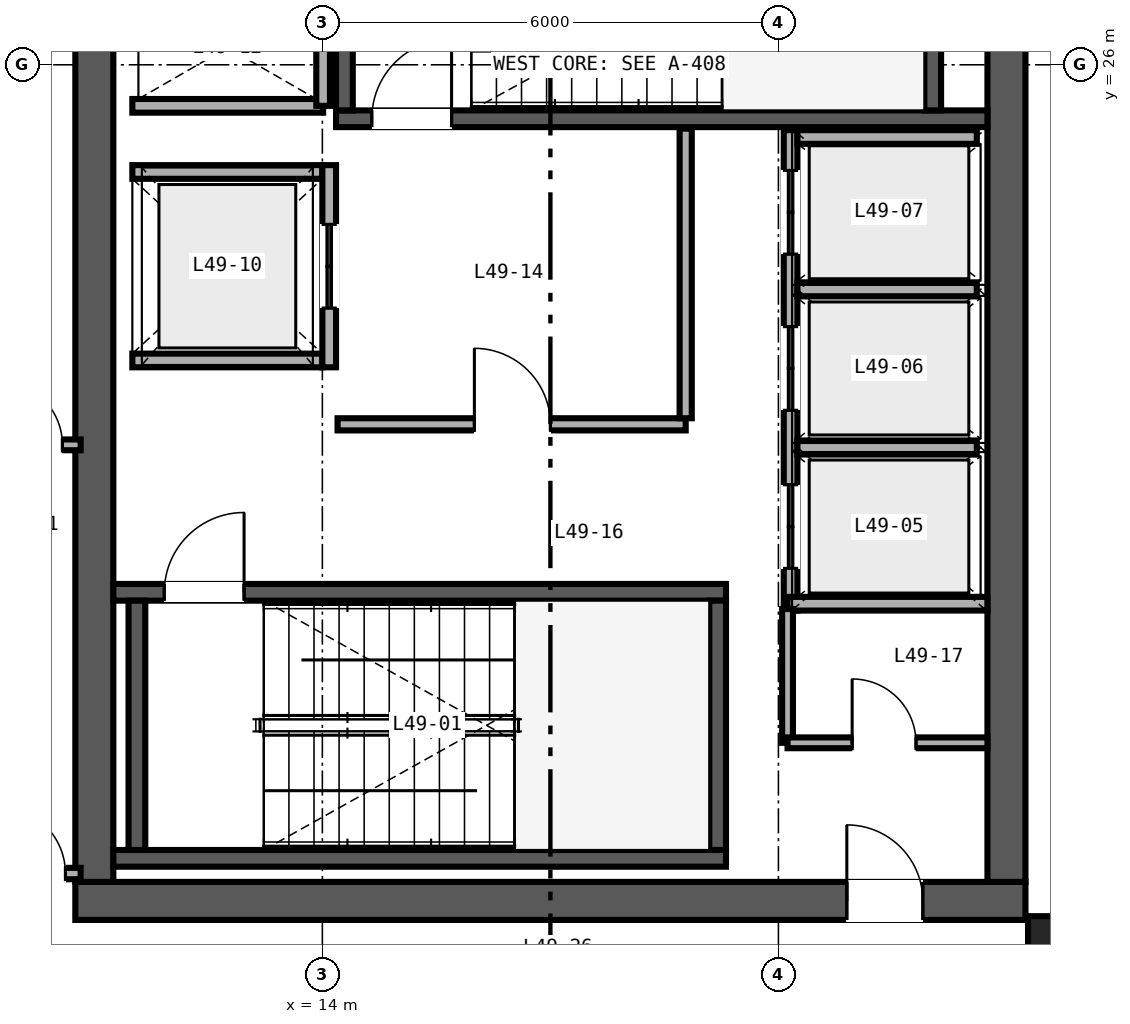
"""IFC4 building model, lengths in metres.
Left out: names, types, materials, properties, quantities, classifications, styles, units other than length and angle.
Written with IfcOpenShell. Run it as: python <this file> out.ifc"""

import sys

from ifc_helpers import new_model, si_unit, direction, frame, frame_2d, origin, origin_2d, place, context, subcontext, project, spatial, rectangle, i_section, extrude, source, transform, mapped, element, fill, save


model = new_model("IFC4")
c1 = context("Model", 3, precision=1e-05, world=origin(), true_north=direction((0.0, 1.0)))
c2 = subcontext(c1, "Body", "Model", "MODEL_VIEW")
j1 = project(units=[si_unit("LENGTHUNIT", "METRE"), si_unit("PLANEANGLEUNIT", "RADIAN")], contexts=[c1])
p1 = place(None, origin())
s1 = spatial("IfcSite", under=j1, at=p1, CompositionType="ELEMENT")
p2 = place(p1, origin())
s2 = spatial("IfcBuilding", under=s1, at=p2, CompositionType="ELEMENT")
p3 = place(p2, frame((0.0, 0.0, 195.6)))
s3 = spatial("IfcBuildingStorey", under=s2, at=p3, CompositionType="ELEMENT", Elevation=195.6)
p4 = place(p3, frame((10.75, 15.0, 0.0), z_axis=(0.0, 0.0, 1.0), x_axis=(1.0, 0.0, 0.0)))
e1 = element("IfcWall", 1, at=p4, inside=s3, PredefinedType="SHEAR", context=c2, shape_type="SweptSolid", body=[
    extrude(rectangle(XDim=12.5, YDim=0.5, at=frame_2d((6.25, 0.0))), origin(), (0.0, 0.0, 1.0), 3.37),
])
p5 = place(p4, frame((10.15, 0.0, 0.0)))
e2 = element("IfcOpeningElement", 2, at=p5, cuts=e1, PredefinedType="OPENING", context=c2, shape_type="SweptSolid", body=[
    extrude(rectangle(XDim=1.0, YDim=2.15, at=frame_2d((0.5, 1.075))), frame((0.0, 0.26, 0.0), z_axis=(0.0, -1.0, 0.0), x_axis=(1.0, 0.0, 0.0)), (0.0, 0.0, 1.0), 0.52),
])
for number, where, z_axis, x_axis in (
    (3, (11.0, 15.25, 0.0), (0.0, 0.0, 1.0), (0.0, 1.0, 0.0)),
    (4, (23.0, 15.25, 0.0), (0.0, 0.0, 1.0), (0.0, 1.0, 0.0)),
):
    element("IfcWall", number, at=place(p3, frame(where, z_axis=z_axis, x_axis=x_axis)), inside=s3, PredefinedType="SHEAR", context=c2, shape_type="SweptSolid", body=[
        extrude(rectangle(XDim=21.5, YDim=0.5, at=frame_2d((10.75, 0.0))), origin(), (0.0, 0.0, 1.0), 3.37),
    ])
p6 = place(p3, frame((11.25, 15.56, 0.0), z_axis=(0.0, 0.0, 1.0), x_axis=(1.0, 0.0, 0.0)))
e5 = element("IfcWall", 5, at=p6, inside=s3, PredefinedType="SHEAR", context=c2, shape_type="SweptSolid", body=[
    extrude(rectangle(XDim=8.06, YDim=0.22, at=frame_2d((4.03, 0.0))), origin(), (0.0, 0.0, 1.0), 3.4),
])
p7 = place(p3, frame((11.25, 19.06, 0.0), z_axis=(0.0, 0.0, 1.0), x_axis=(1.0, 0.0, 0.0)))
e6 = element("IfcWall", 6, at=p7, inside=s3, PredefinedType="SHEAR", context=c2, shape_type="SweptSolid", body=[
    extrude(rectangle(XDim=8.06, YDim=0.22, at=frame_2d((4.03, 0.0))), origin(), (0.0, 0.0, 1.0), 3.4),
])
p8 = place(p7, frame((0.67, 0.0, 0.0)))
e7 = element("IfcOpeningElement", 7, at=p8, cuts=e6, PredefinedType="OPENING", context=c2, shape_type="SweptSolid", body=[
    extrude(rectangle(XDim=1.05, YDim=2.15, at=frame_2d((0.525, 1.075))), frame((0.0, 0.12, 0.0), z_axis=(0.0, -1.0, 0.0), x_axis=(1.0, 0.0, 0.0)), (0.0, 0.0, 1.0), 0.24),
])
for number, where, z_axis, x_axis in (
    (8, (11.56, 15.67, 0.0), (0.0, 0.0, 1.0), (0.0, 1.0, 0.0)),
    (9, (19.2, 15.67, 0.0), (0.0, 0.0, 1.0), (0.0, 1.0, 0.0)),
):
    element("IfcWall", number, at=place(p3, frame(where, z_axis=z_axis, x_axis=x_axis)), inside=s3, PredefinedType="SHEAR", context=c2, shape_type="SweptSolid", body=[
        extrude(rectangle(XDim=3.28, YDim=0.22, at=frame_2d((1.64, 0.0))), origin(), (0.0, 0.0, 1.0), 3.4),
    ])
p9 = place(p3, frame((14.18, 25.29, 0.0), z_axis=(0.0, 0.0, 1.0), x_axis=(1.0, 0.0, 0.0)))
e10 = element("IfcWall", 10, at=p9, inside=s3, PredefinedType="SHEAR", context=c2, shape_type="SweptSolid", body=[
    extrude(rectangle(XDim=8.57, YDim=0.22, at=frame_2d((4.285, 0.0))), origin(), (0.0, 0.0, 1.0), 3.4),
])
p10 = place(p9, frame((0.47, 0.0, 0.0)))
e11 = element("IfcOpeningElement", 11, at=p10, cuts=e10, PredefinedType="OPENING", context=c2, shape_type="SweptSolid", body=[
    extrude(rectangle(XDim=1.05, YDim=2.15, at=frame_2d((0.525, 1.075))), frame((0.0, 0.12, 0.0), z_axis=(0.0, -1.0, 0.0), x_axis=(1.0, 0.0, 0.0)), (0.0, 0.0, 1.0), 0.24),
])
for number, where, z_axis, x_axis in (
    (12, (14.29, 25.4, 0.0), (0.0, 0.0, 1.0), (0.0, 1.0, 0.0)),
    (13, (22.03, 25.4, 0.0), (0.0, 0.0, 1.0), (0.0, 1.0, 0.0)),
):
    element("IfcWall", number, at=place(p3, frame(where, z_axis=z_axis, x_axis=x_axis)), inside=s3, PredefinedType="SHEAR", context=c2, shape_type="SweptSolid", body=[
        extrude(rectangle(XDim=3.28, YDim=0.22, at=frame_2d((1.64, 0.0))), origin(), (0.0, 0.0, 1.0), 3.4),
    ])
m1 = source(origin(), c2, "Body", "SweptSolid", [
    extrude(i_section(OverallWidth=0.432, OverallDepth=0.498, WebThickness=0.056, FlangeThickness=0.089, FilletRadius=0.025, at=origin_2d()), origin(), (0.0, 0.0, 1.0), 3.37),
])
p11 = place(p3, frame((23.5, 14.55, 0.0), z_axis=(0.0, 0.0, 1.0), x_axis=(1.0, 0.0, 0.0)))
e14 = element("IfcColumn", 14, at=p11, inside=s3, PredefinedType="COLUMN", context=c2, shape_type="MappedRepresentation", body=[
    mapped(m1, transform((0.0, 0.0, 0.0), scale=1.0)),
])
p12 = place(p3, frame((20.16, 18.82, 0.0), z_axis=(0.0, 0.0, 1.0), x_axis=(0.0, 1.0, 0.0)))
e15 = element("IfcWall", 15, at=p12, inside=s3, PredefinedType="SOLIDWALL", context=c2, shape_type="SweptSolid", body=[
    extrude(rectangle(XDim=6.32, YDim=0.18, at=frame_2d((3.16, 0.0))), origin(), (0.0, 0.0, 1.0), 2.47),
])
p13 = place(p12, frame((0.555, 0.0, 0.0)))
e16 = element("IfcOpeningElement", 16, at=p13, cuts=e15, PredefinedType="OPENING", context=c2, shape_type="SweptSolid", body=[
    extrude(rectangle(XDim=1.1, YDim=2.2, at=frame_2d((0.55, 1.1))), frame((0.0, 0.1, 0.0), z_axis=(0.0, -1.0, 0.0), x_axis=(1.0, 0.0, 0.0)), (0.0, 0.0, 1.0), 0.2),
])
p14 = place(p12, frame((2.635, 0.0, 0.0)))
e17 = element("IfcOpeningElement", 17, at=p14, cuts=e15, PredefinedType="OPENING", context=c2, shape_type="SweptSolid", body=[
    extrude(rectangle(XDim=1.1, YDim=2.2, at=frame_2d((0.55, 1.1))), frame((0.0, 0.1, 0.0), z_axis=(0.0, -1.0, 0.0), x_axis=(1.0, 0.0, 0.0)), (0.0, 0.0, 1.0), 0.2),
])
p15 = place(p12, frame((4.69, 0.0, 0.0)))
e18 = element("IfcOpeningElement", 18, at=p15, cuts=e15, PredefinedType="OPENING", context=c2, shape_type="SweptSolid", body=[
    extrude(rectangle(XDim=1.1, YDim=2.2, at=frame_2d((0.55, 1.1))), frame((0.0, 0.1, 0.0), z_axis=(0.0, -1.0, 0.0), x_axis=(1.0, 0.0, 0.0)), (0.0, 0.0, 1.0), 0.2),
])
p16 = place(p3, frame((20.12, 18.91, 0.0), z_axis=(0.0, 0.0, 1.0), x_axis=(1.0, 0.0, 0.0)))
e19 = element("IfcWall", 19, at=p16, inside=s3, PredefinedType="SOLIDWALL", context=c2, shape_type="SweptSolid", body=[
    extrude(rectangle(XDim=2.63, YDim=0.18, at=frame_2d((1.315, 0.0))), origin(), (0.0, 0.0, 1.0), 3.37),
])
p17 = place(p3, frame((20.25, 25.05, 0.0), z_axis=(0.0, 0.0, 1.0), x_axis=(1.0, 0.0, 0.0)))
e20 = element("IfcWall", 20, at=p17, inside=s3, PredefinedType="SOLIDWALL", context=c2, shape_type="SweptSolid", body=[
    extrude(rectangle(XDim=2.36, YDim=0.18, at=frame_2d((1.18, 0.0))), origin(), (0.0, 0.0, 1.0), 3.37),
])
p18 = place(p3, frame((20.25, 20.965, 0.0), z_axis=(0.0, 0.0, 1.0), x_axis=(1.0, 0.0, 0.0)))
e21 = element("IfcWall", 21, at=p18, inside=s3, PredefinedType="SOLIDWALL", context=c2, shape_type="SweptSolid", body=[
    extrude(rectangle(XDim=2.36, YDim=0.18, at=frame_2d((1.18, 0.0))), origin(), (0.0, 0.0, 1.0), 2.47),
])
p19 = place(p3, frame((20.25, 23.045, 0.0), z_axis=(0.0, 0.0, 1.0), x_axis=(1.0, 0.0, 0.0)))
e22 = element("IfcWall", 22, at=p19, inside=s3, PredefinedType="SOLIDWALL", context=c2, shape_type="SweptSolid", body=[
    extrude(rectangle(XDim=2.36, YDim=0.18, at=frame_2d((1.18, 0.0))), origin(), (0.0, 0.0, 1.0), 3.37),
])
for number, where, z_axis, x_axis in (
    (23, (11.5, 22.11, 0.0), (0.0, 0.0, 1.0), (1.0, 0.0, 0.0)),
    (24, (11.5, 24.59, 0.0), (0.0, 0.0, 1.0), (1.0, 0.0, 0.0)),
):
    element("IfcWall", number, at=place(p3, frame(where, z_axis=z_axis, x_axis=x_axis)), inside=s3, PredefinedType="SOLIDWALL", context=c2, shape_type="SweptSolid", body=[
        extrude(rectangle(XDim=2.5, YDim=0.18, at=frame_2d((1.25, 0.0))), origin(), (0.0, 0.0, 1.0), 3.37),
    ])
p20 = place(p3, frame((14.09, 22.02, 0.0), z_axis=(0.0, 0.0, 1.0), x_axis=(0.0, 1.0, 0.0)))
e25 = element("IfcWall", 25, at=p20, inside=s3, PredefinedType="SOLIDWALL", context=c2, shape_type="SweptSolid", body=[
    extrude(rectangle(XDim=2.66, YDim=0.18, at=frame_2d((1.33, 0.0))), origin(), (0.0, 0.0, 1.0), 3.37),
])
p21 = place(p20, frame((0.78, 0.0, 0.0)))
e26 = element("IfcOpeningElement", 26, at=p21, cuts=e25, PredefinedType="OPENING", context=c2, shape_type="SweptSolid", body=[
    extrude(rectangle(XDim=1.1, YDim=2.2, at=frame_2d((0.55, 1.1))), frame((0.0, 0.1, 0.0), z_axis=(0.0, -1.0, 0.0), x_axis=(1.0, 0.0, 0.0)), (0.0, 0.0, 1.0), 0.2),
])
p22 = place(p3, frame((11.5, 25.46, 0.0), z_axis=(0.0, 0.0, 1.0), x_axis=(1.0, 0.0, 0.0)))
e27 = element("IfcWall", 27, at=p22, inside=s3, PredefinedType="SOLIDWALL", context=c2, shape_type="SweptSolid", body=[
    extrude(rectangle(XDim=2.51, YDim=0.18, at=frame_2d((1.255, 0.0))), origin(), (0.0, 0.0, 1.0), 3.37),
])
p23 = place(p3, frame((14.01, 25.46, 0.0), z_axis=(0.0, 0.0, 1.0), x_axis=(0.0, 1.0, 0.0)))
e28 = element("IfcWall", 28, at=p23, inside=s3, PredefinedType="SOLIDWALL", context=c2, shape_type="SweptSolid", body=[
    extrude(rectangle(XDim=3.08, YDim=0.18, at=frame_2d((1.54, 0.0))), origin(), (0.0, 0.0, 1.0), 3.37),
])
p24 = place(p3, frame((14.2, 21.27, 0.0), z_axis=(0.0, 0.0, 1.0), x_axis=(1.0, 0.0, 0.0)))
e29 = element("IfcWall", 29, at=p24, inside=s3, PredefinedType="PARTITIONING", context=c2, shape_type="SweptSolid", body=[
    extrude(rectangle(XDim=4.58, YDim=0.16, at=frame_2d((2.29, 0.0))), origin(), (0.0, 0.0, 1.0), 3.37),
])
p25 = place(p24, frame((1.8, 0.0, 0.0)))
e30 = element("IfcOpeningElement", 30, at=p25, cuts=e29, PredefinedType="OPENING", context=c2, shape_type="SweptSolid", body=[
    extrude(rectangle(XDim=1.0, YDim=2.15, at=frame_2d((0.5, 1.075))), frame((0.0, 0.09, 0.0), z_axis=(0.0, -1.0, 0.0), x_axis=(1.0, 0.0, 0.0)), (0.0, 0.0, 1.0), 0.18),
])
p26 = place(p3, frame((18.78, 21.35, 0.0), z_axis=(0.0, 0.0, 1.0), x_axis=(0.0, 1.0, 0.0)))
e31 = element("IfcWall", 31, at=p26, inside=s3, PredefinedType="PARTITIONING", context=c2, shape_type="SweptSolid", body=[
    extrude(rectangle(XDim=3.81, YDim=0.16, at=frame_2d((1.905, 0.0))), origin(), (0.0, 0.0, 1.0), 3.37),
])
p27 = place(p3, frame((20.12, 17.08, 0.0), z_axis=(0.0, 0.0, 1.0), x_axis=(0.0, 1.0, 0.0)))
e32 = element("IfcWall", 32, at=p27, inside=s3, PredefinedType="PARTITIONING", context=c2, shape_type="SweptSolid", body=[
    extrude(rectangle(XDim=1.76, YDim=0.142, at=frame_2d((0.88, 0.0))), origin(), (0.0, 0.0, 1.0), 3.37),
])
p28 = place(p3, frame((20.12, 17.08, 0.0), z_axis=(0.0, 0.0, 1.0), x_axis=(1.0, 0.0, 0.0)))
e33 = element("IfcWall", 33, at=p28, inside=s3, PredefinedType="PARTITIONING", context=c2, shape_type="SweptSolid", body=[
    extrude(rectangle(XDim=2.63, YDim=0.142, at=frame_2d((1.315, 0.0))), origin(), (0.0, 0.0, 1.0), 3.37),
])
p29 = place(p28, frame((0.85, 0.0, 0.0)))
e34 = element("IfcOpeningElement", 34, at=p29, cuts=e33, PredefinedType="OPENING", context=c2, shape_type="SweptSolid", body=[
    extrude(rectangle(XDim=0.84, YDim=2.1, at=frame_2d((0.42, 1.05))), frame((0.0, 0.081, 0.0), z_axis=(0.0, -1.0, 0.0), x_axis=(1.0, 0.0, 0.0)), (0.0, 0.0, 1.0), 0.162),
])
p30 = place(p3, frame((8.16, 15.36, 0.0), z_axis=(0.0, 0.0, 1.0), x_axis=(1.0, 0.0, 0.0)))
e35 = element("IfcWall", 35, at=p30, inside=s3, PredefinedType="PARTITIONING", context=c2, shape_type="SweptSolid", body=[
    extrude(rectangle(XDim=2.66, YDim=0.15, at=frame_2d((1.33, 0.0))), origin(), (0.0, 0.0, 1.0), 2.591),
])
p31 = place(p30, frame((1.58, 0.0, 0.0)))
e36 = element("IfcOpeningElement", 36, at=p31, cuts=e35, PredefinedType="OPENING", context=c2, shape_type="SweptSolid", body=[
    extrude(rectangle(XDim=0.88, YDim=2.15, at=frame_2d((0.44, 1.075))), frame((0.0, 0.085, 0.0), z_axis=(0.0, -1.0, 0.0), x_axis=(1.0, 0.0, 0.0)), (0.0, 0.0, 1.0), 0.17),
])
p32 = place(p3, frame((8.16, 21.0, 0.0), z_axis=(0.0, 0.0, 1.0), x_axis=(1.0, 0.0, 0.0)))
e37 = element("IfcWall", 37, at=p32, inside=s3, PredefinedType="PARTITIONING", context=c2, shape_type="SweptSolid", body=[
    extrude(rectangle(XDim=2.66, YDim=0.142, at=frame_2d((1.33, 0.0))), origin(), (0.0, 0.0, 1.0), 2.47),
])
p33 = place(p32, frame((1.58, 0.0, 0.0)))
e38 = element("IfcOpeningElement", 38, at=p33, cuts=e37, PredefinedType="OPENING", context=c2, shape_type="SweptSolid", body=[
    extrude(rectangle(XDim=0.84, YDim=2.1, at=frame_2d((0.42, 1.05))), frame((0.0, 0.081, 0.0), z_axis=(0.0, -1.0, 0.0), x_axis=(1.0, 0.0, 0.0)), (0.0, 0.0, 1.0), 0.162),
])
m2 = source(origin(), c2, "Body", "SweptSolid", [
    extrude(rectangle(XDim=1.05, YDim=2.15, at=frame_2d((0.525, 1.075))), frame((0.0, 0.025, 0.0), z_axis=(0.0, -1.0, 0.0), x_axis=(1.0, 0.0, 0.0)), (0.0, 0.0, 1.0), 0.05),
])
p34 = place(p8, origin())
e39 = element("IfcDoor", 39, at=p34, inside=s3, OperationType="SINGLE_SWING_RIGHT", PredefinedType="DOOR", context=c2, shape_type="MappedRepresentation", body=[
    mapped(m2, transform((0.0, 0.0, 0.0), scale=1.0)),
])
fill(e7, e39)
p35 = place(p10, origin())
e40 = element("IfcDoor", 40, at=p35, inside=s3, OperationType="SINGLE_SWING_RIGHT", PredefinedType="DOOR", context=c2, shape_type="MappedRepresentation", body=[
    mapped(m2, transform((0.0, 0.0, 0.0), scale=1.0)),
])
fill(e11, e40)
m3 = source(origin(), c2, "Body", "SweptSolid", [
    extrude(rectangle(XDim=1.1, YDim=2.2, at=frame_2d((0.55, 1.1))), frame((0.0, 0.025, 0.0), z_axis=(0.0, -1.0, 0.0), x_axis=(1.0, 0.0, 0.0)), (0.0, 0.0, 1.0), 0.05),
])
p36 = place(p13, origin())
e41 = element("IfcDoor", 41, at=p36, inside=s3, OperationType="DOUBLE_DOOR_SLIDING", PredefinedType="DOOR", context=c2, shape_type="MappedRepresentation", body=[
    mapped(m3, transform((0.0, 0.0, 0.0), scale=1.0)),
])
fill(e16, e41)
p37 = place(p14, origin())
e42 = element("IfcDoor", 42, at=p37, inside=s3, OperationType="DOUBLE_DOOR_SLIDING", PredefinedType="DOOR", context=c2, shape_type="MappedRepresentation", body=[
    mapped(m3, transform((0.0, 0.0, 0.0), scale=1.0)),
])
fill(e17, e42)
p38 = place(p15, origin())
e43 = element("IfcDoor", 43, at=p38, inside=s3, OperationType="DOUBLE_DOOR_SLIDING", PredefinedType="DOOR", context=c2, shape_type="MappedRepresentation", body=[
    mapped(m3, transform((0.0, 0.0, 0.0), scale=1.0)),
])
fill(e18, e43)
p39 = place(p21, origin())
e44 = element("IfcDoor", 44, at=p39, inside=s3, OperationType="DOUBLE_DOOR_SLIDING", PredefinedType="DOOR", context=c2, shape_type="MappedRepresentation", body=[
    mapped(m3, transform((0.0, 0.0, 0.0), scale=1.0)),
])
fill(e26, e44)
m4 = source(origin(), c2, "Body", "SweptSolid", [
    extrude(rectangle(XDim=1.0, YDim=2.15, at=frame_2d((0.5, 1.075))), frame((0.0, 0.025, 0.0), z_axis=(0.0, -1.0, 0.0), x_axis=(1.0, 0.0, 0.0)), (0.0, 0.0, 1.0), 0.05),
])
p40 = place(p25, origin())
e45 = element("IfcDoor", 45, at=p40, inside=s3, OperationType="SINGLE_SWING_LEFT", PredefinedType="DOOR", context=c2, shape_type="MappedRepresentation", body=[
    mapped(m4, transform((0.0, 0.0, 0.0), scale=1.0)),
])
fill(e30, e45)
m5 = source(origin(), c2, "Body", "SweptSolid", [
    extrude(rectangle(XDim=0.84, YDim=2.1, at=frame_2d((0.42, 1.05))), frame((0.0, 0.025, 0.0), z_axis=(0.0, -1.0, 0.0), x_axis=(1.0, 0.0, 0.0)), (0.0, 0.0, 1.0), 0.05),
])
p41 = place(p29, origin())
e46 = element("IfcDoor", 46, at=p41, inside=s3, OperationType="SINGLE_SWING_LEFT", PredefinedType="DOOR", context=c2, shape_type="MappedRepresentation", body=[
    mapped(m5, transform((0.0, 0.0, 0.0), scale=1.0)),
])
fill(e34, e46)
p42 = place(p5, origin())
e47 = element("IfcDoor", 47, at=p42, inside=s3, OperationType="SINGLE_SWING_LEFT", PredefinedType="DOOR", context=c2, shape_type="MappedRepresentation", body=[
    mapped(m4, transform((0.0, 0.0, 0.0), scale=1.0)),
])
fill(e2, e47)
m6 = source(origin(), c2, "Body", "SweptSolid", [
    extrude(rectangle(XDim=0.88, YDim=2.15, at=frame_2d((0.44, 1.075))), frame((0.0, 0.025, 0.0), z_axis=(0.0, -1.0, 0.0), x_axis=(1.0, 0.0, 0.0)), (0.0, 0.0, 1.0), 0.05),
])
p43 = place(p31, origin())
e48 = element("IfcDoor", 48, at=p43, inside=s3, OperationType="SINGLE_SWING_LEFT", PredefinedType="DOOR", context=c2, shape_type="MappedRepresentation", body=[
    mapped(m6, transform((0.0, 0.0, 0.0), scale=1.0)),
])
fill(e36, e48)
p44 = place(p33, origin())
e49 = element("IfcDoor", 49, at=p44, inside=s3, OperationType="SINGLE_SWING_LEFT", PredefinedType="DOOR", context=c2, shape_type="MappedRepresentation", body=[
    mapped(m5, transform((0.0, 0.0, 0.0), scale=1.0)),
])
fill(e38, e49)
save(model, sys.argv[1])
